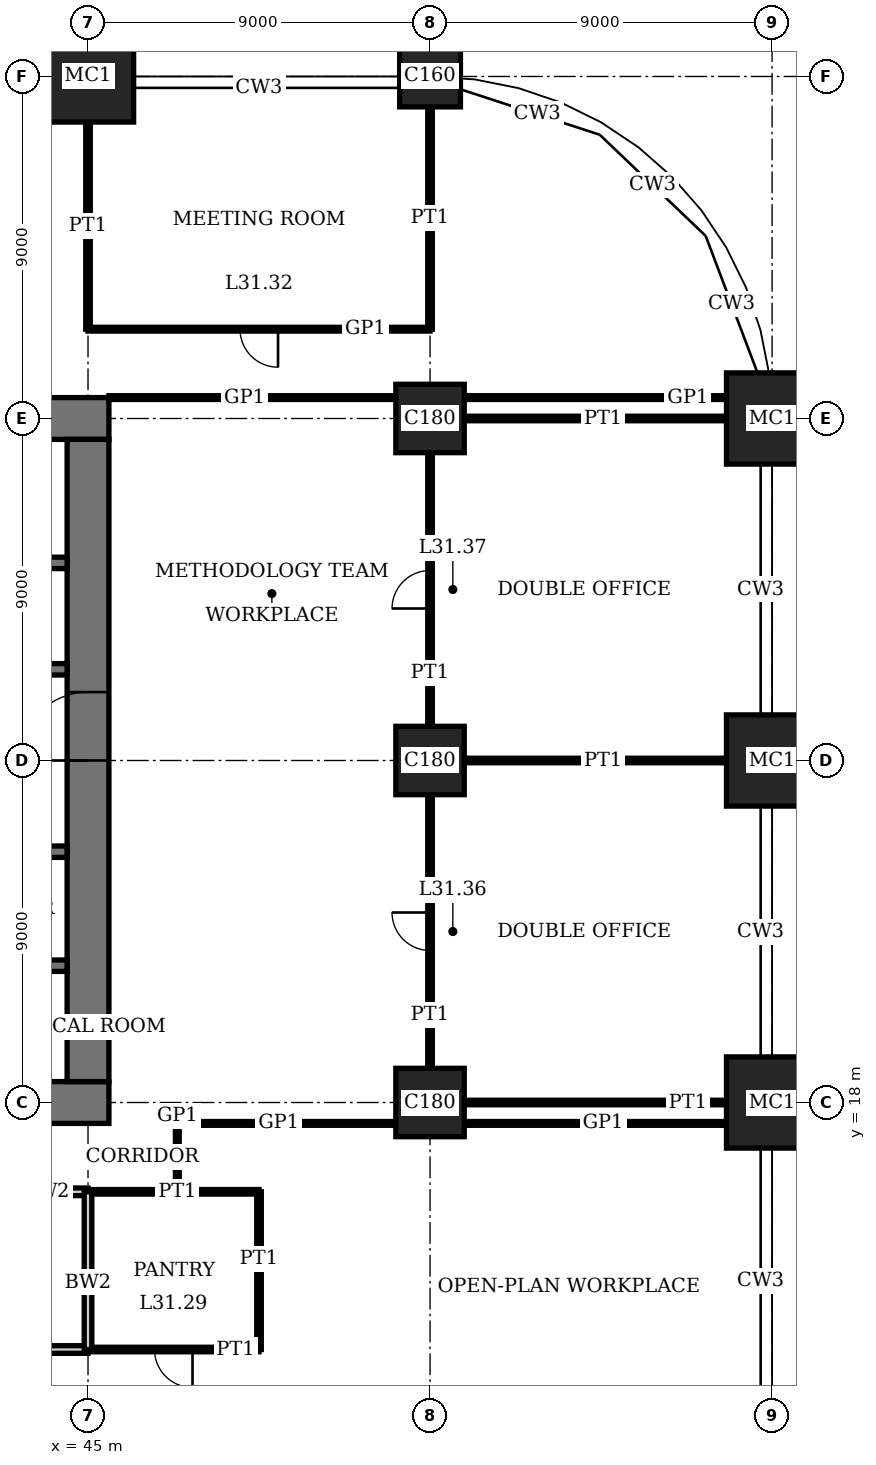
"""IFC4 building model, lengths in metres.
Left out: names, types, materials, properties, quantities, classifications, styles, units other than length and angle.
Written with IfcOpenShell. Run it as: python <this file> out.ifc"""

import sys

from ifc_helpers import new_model, si_unit, direction, frame, frame_2d, origin, origin_2d, place, context, subcontext, project, spatial, rectangle, extrude, element, fill, save


model = new_model("IFC4")
c1 = context("Model", 3, precision=1e-05, world=origin(), true_north=direction((0.0, 1.0)))
c2 = subcontext(c1, "Body", "Model", "MODEL_VIEW")
j1 = project(units=[si_unit("LENGTHUNIT", "METRE"), si_unit("PLANEANGLEUNIT", "RADIAN")], contexts=[c1])
p1 = place(None, origin())
s1 = spatial("IfcSite", under=j1, at=p1, CompositionType="ELEMENT")
p2 = place(p1, origin())
s2 = spatial("IfcBuilding", under=s1, at=p2, CompositionType="ELEMENT")
p3 = place(p2, frame((0.0, 0.0, 129.0)))
s3 = spatial("IfcBuildingStorey", under=s2, at=p3, CompositionType="ELEMENT", Elevation=129.0)
p4 = place(p3, frame((45.0, 45.0, 0.0), z_axis=(0.0, 0.0, 1.0), x_axis=(1.0, 0.0, 0.0)))
e1 = element("IfcColumn", 1, at=p4, inside=s3, PredefinedType="COLUMN", context=c2, shape_type="SweptSolid", body=[
    extrude(rectangle(XDim=2.4, YDim=2.4, at=origin_2d()), origin(), (0.0, 0.0, 1.0), 4.0),
])
for number, where, z_axis, x_axis in (
    (2, (54.0, 18.0, 0.0), (0.0, 0.0, 1.0), (1.0, 0.0, 0.0)),
    (3, (54.0, 27.0, 0.0), (0.0, 0.0, 1.0), (1.0, 0.0, 0.0)),
    (4, (54.0, 36.0, 0.0), (0.0, 0.0, 1.0), (1.0, 0.0, 0.0)),
):
    element("IfcColumn", number, at=place(p3, frame(where, z_axis=z_axis, x_axis=x_axis)), inside=s3, PredefinedType="COLUMN", context=c2, shape_type="SweptSolid", body=[
        extrude(rectangle(XDim=1.8, YDim=1.8, at=origin_2d()), origin(), (0.0, 0.0, 1.0), 4.0),
    ])
p5 = place(p3, frame((54.0, 45.0, 0.0), z_axis=(0.0, 0.0, 1.0), x_axis=(1.0, 0.0, 0.0)))
e5 = element("IfcColumn", 5, at=p5, inside=s3, PredefinedType="COLUMN", context=c2, shape_type="SweptSolid", body=[
    extrude(rectangle(XDim=1.6, YDim=1.6, at=origin_2d()), origin(), (0.0, 0.0, 1.0), 4.0),
])
for number, where, z_axis, x_axis in (
    (6, (63.0, 18.0, 0.0), (0.0, 0.0, 1.0), (1.0, 0.0, 0.0)),
    (7, (63.0, 27.0, 0.0), (0.0, 0.0, 1.0), (1.0, 0.0, 0.0)),
    (8, (63.0, 36.0, 0.0), (0.0, 0.0, 1.0), (1.0, 0.0, 0.0)),
):
    element("IfcColumn", number, at=place(p3, frame(where, z_axis=z_axis, x_axis=x_axis)), inside=s3, PredefinedType="COLUMN", context=c2, shape_type="SweptSolid", body=[
        extrude(rectangle(XDim=2.4, YDim=2.4, at=origin_2d()), origin(), (0.0, 0.0, 1.0), 4.0),
    ])
p6 = place(p3, frame((17.45, 18.0, 0.0), z_axis=(0.0, 0.0, 1.0), x_axis=(1.0, 0.0, 0.0)))
e9 = element("IfcWall", 9, at=p6, inside=s3, PredefinedType="SHEAR", context=c2, shape_type="SweptSolid", body=[
    extrude(rectangle(XDim=28.1, YDim=1.1, at=frame_2d((14.05, 0.0))), origin(), (0.0, 0.0, 1.0), 4.0),
])
p7 = place(p6, frame((11.55, 0.0, 0.0)))
e10 = element("IfcOpeningElement", 10, at=p7, cuts=e9, PredefinedType="OPENING", context=c2, shape_type="SweptSolid", body=[
    extrude(rectangle(XDim=1.0, YDim=2.4, at=frame_2d((0.5, 1.2))), frame((0.0, 0.56, 0.0), z_axis=(0.0, -1.0, 0.0), x_axis=(1.0, 0.0, 0.0)), (0.0, 0.0, 1.0), 1.12),
])
p8 = place(p6, frame((16.55, 0.0, 0.0)))
e11 = element("IfcOpeningElement", 11, at=p8, cuts=e9, PredefinedType="OPENING", context=c2, shape_type="SweptSolid", body=[
    extrude(rectangle(XDim=1.0, YDim=2.4, at=frame_2d((0.5, 1.2))), frame((0.0, 0.56, 0.0), z_axis=(0.0, -1.0, 0.0), x_axis=(1.0, 0.0, 0.0)), (0.0, 0.0, 1.0), 1.12),
])
p9 = place(p6, frame((20.0, 0.0, 0.0)))
e12 = element("IfcOpeningElement", 12, at=p9, cuts=e9, PredefinedType="OPENING", context=c2, shape_type="SweptSolid", body=[
    extrude(rectangle(XDim=1.1, YDim=2.4, at=frame_2d((0.55, 1.2))), frame((0.0, 0.56, 0.0), z_axis=(0.0, -1.0, 0.0), x_axis=(1.0, 0.0, 0.0)), (0.0, 0.0, 1.0), 1.12),
])
p10 = place(p6, frame((24.05, 0.0, 0.0)))
e13 = element("IfcOpeningElement", 13, at=p10, cuts=e9, PredefinedType="OPENING", context=c2, shape_type="SweptSolid", body=[
    extrude(rectangle(XDim=1.0, YDim=2.4, at=frame_2d((0.5, 1.2))), frame((0.0, 0.56, 0.0), z_axis=(0.0, -1.0, 0.0), x_axis=(1.0, 0.0, 0.0)), (0.0, 0.0, 1.0), 1.12),
])
p11 = place(p3, frame((45.55, 36.0, 0.0), z_axis=(0.0, 0.0, 1.0), x_axis=(-1.0, 0.0, 0.0)))
e14 = element("IfcWall", 14, at=p11, inside=s3, PredefinedType="SHEAR", context=c2, shape_type="SweptSolid", body=[
    extrude(rectangle(XDim=28.1, YDim=1.1, at=frame_2d((14.05, 0.0))), origin(), (0.0, 0.0, 1.0), 4.0),
])
p12 = place(p11, frame((11.55, 0.0, 0.0)))
e15 = element("IfcOpeningElement", 15, at=p12, cuts=e14, PredefinedType="OPENING", context=c2, shape_type="SweptSolid", body=[
    extrude(rectangle(XDim=1.0, YDim=2.4, at=frame_2d((0.5, 1.2))), frame((0.0, 0.56, 0.0), z_axis=(0.0, -1.0, 0.0), x_axis=(1.0, 0.0, 0.0)), (0.0, 0.0, 1.0), 1.12),
])
p13 = place(p11, frame((16.55, 0.0, 0.0)))
e16 = element("IfcOpeningElement", 16, at=p13, cuts=e14, PredefinedType="OPENING", context=c2, shape_type="SweptSolid", body=[
    extrude(rectangle(XDim=1.0, YDim=2.4, at=frame_2d((0.5, 1.2))), frame((0.0, 0.56, 0.0), z_axis=(0.0, -1.0, 0.0), x_axis=(1.0, 0.0, 0.0)), (0.0, 0.0, 1.0), 1.12),
])
p14 = place(p11, frame((20.0, 0.0, 0.0)))
e17 = element("IfcOpeningElement", 17, at=p14, cuts=e14, PredefinedType="OPENING", context=c2, shape_type="SweptSolid", body=[
    extrude(rectangle(XDim=1.1, YDim=2.4, at=frame_2d((0.55, 1.2))), frame((0.0, 0.56, 0.0), z_axis=(0.0, -1.0, 0.0), x_axis=(1.0, 0.0, 0.0)), (0.0, 0.0, 1.0), 1.12),
])
p15 = place(p11, frame((24.05, 0.0, 0.0)))
e18 = element("IfcOpeningElement", 18, at=p15, cuts=e14, PredefinedType="OPENING", context=c2, shape_type="SweptSolid", body=[
    extrude(rectangle(XDim=1.0, YDim=2.4, at=frame_2d((0.5, 1.2))), frame((0.0, 0.56, 0.0), z_axis=(0.0, -1.0, 0.0), x_axis=(1.0, 0.0, 0.0)), (0.0, 0.0, 1.0), 1.12),
])
p16 = place(p3, frame((45.0, 18.55, 0.0), z_axis=(0.0, 0.0, 1.0), x_axis=(0.0, 1.0, 0.0)))
e19 = element("IfcWall", 19, at=p16, inside=s3, PredefinedType="SHEAR", context=c2, shape_type="SweptSolid", body=[
    extrude(rectangle(XDim=16.9, YDim=1.1, at=frame_2d((8.45, 0.0))), origin(), (0.0, 0.0, 1.0), 4.0),
])
p17 = place(p16, frame((8.45, 0.0, 0.0)))
e20 = element("IfcOpeningElement", 20, at=p17, cuts=e19, PredefinedType="OPENING", context=c2, shape_type="SweptSolid", body=[
    extrude(rectangle(XDim=1.8, YDim=2.4, at=frame_2d((0.9, 1.2))), frame((0.0, 0.56, 0.0), z_axis=(0.0, -1.0, 0.0), x_axis=(1.0, 0.0, 0.0)), (0.0, 0.0, 1.0), 1.12),
])
p18 = place(p3, frame((36.15, 32.2, 0.0), z_axis=(0.0, 0.0, 1.0), x_axis=(1.0, 0.0, 0.0)))
e21 = element("IfcWall", 21, at=p18, inside=s3, PredefinedType="SHEAR", context=c2, shape_type="SweptSolid", body=[
    extrude(rectangle(XDim=8.3, YDim=0.3, at=frame_2d((4.15, 0.0))), origin(), (0.0, 0.0, 1.0), 4.0),
])
p19 = place(p18, frame((0.45, 0.0, 0.0)))
e22 = element("IfcOpeningElement", 22, at=p19, cuts=e21, PredefinedType="OPENING", context=c2, shape_type="SweptSolid", body=[
    extrude(rectangle(XDim=1.0, YDim=2.4, at=frame_2d((0.5, 1.2))), frame((0.0, 0.16, 0.0), z_axis=(0.0, -1.0, 0.0), x_axis=(1.0, 0.0, 0.0)), (0.0, 0.0, 1.0), 0.32),
])
p20 = place(p3, frame((18.55, 24.6, 0.0), z_axis=(0.0, 0.0, 1.0), x_axis=(1.0, 0.0, 0.0)))
e23 = element("IfcWall", 23, at=p20, inside=s3, PredefinedType="SHEAR", context=c2, shape_type="SweptSolid", body=[
    extrude(rectangle(XDim=25.9, YDim=0.3, at=frame_2d((12.95, 0.0))), origin(), (0.0, 0.0, 1.0), 4.0),
])
p21 = place(p20, frame((4.95, 0.0, 0.0)))
e24 = element("IfcOpeningElement", 24, at=p21, cuts=e23, PredefinedType="OPENING", context=c2, shape_type="SweptSolid", body=[
    extrude(rectangle(XDim=1.0, YDim=2.4, at=frame_2d((0.5, 1.2))), frame((0.0, 0.16, 0.0), z_axis=(0.0, -1.0, 0.0), x_axis=(1.0, 0.0, 0.0)), (0.0, 0.0, 1.0), 0.32),
])
p22 = place(p20, frame((24.5, 0.0, 0.0)))
e25 = element("IfcOpeningElement", 25, at=p22, cuts=e23, PredefinedType="OPENING", context=c2, shape_type="SweptSolid", body=[
    extrude(rectangle(XDim=0.9, YDim=2.1, at=frame_2d((0.45, 1.05))), frame((0.0, 0.16, 0.0), z_axis=(0.0, -1.0, 0.0), x_axis=(1.0, 0.0, 0.0)), (0.0, 0.0, 1.0), 0.32),
])
p23 = place(p20, frame((21.3, 0.0, 0.0)))
e26 = element("IfcOpeningElement", 26, at=p23, cuts=e23, PredefinedType="OPENING", context=c2, shape_type="SweptSolid", body=[
    extrude(rectangle(XDim=1.3, YDim=2.4, at=frame_2d((0.65, 1.2))), frame((0.0, 0.16, 0.0), z_axis=(0.0, -1.0, 0.0), x_axis=(1.0, 0.0, 0.0)), (0.0, 0.0, 1.0), 0.32),
])
p24 = place(p3, frame((18.55, 29.4, 0.0), z_axis=(0.0, 0.0, 1.0), x_axis=(1.0, 0.0, 0.0)))
e27 = element("IfcWall", 27, at=p24, inside=s3, PredefinedType="SHEAR", context=c2, shape_type="SweptSolid", body=[
    extrude(rectangle(XDim=25.9, YDim=0.3, at=frame_2d((12.95, 0.0))), origin(), (0.0, 0.0, 1.0), 4.0),
])
p25 = place(p24, frame((19.95, 0.0, 0.0)))
e28 = element("IfcOpeningElement", 28, at=p25, cuts=e27, PredefinedType="OPENING", context=c2, shape_type="SweptSolid", body=[
    extrude(rectangle(XDim=1.0, YDim=2.4, at=frame_2d((0.5, 1.2))), frame((0.0, 0.16, 0.0), z_axis=(0.0, -1.0, 0.0), x_axis=(1.0, 0.0, 0.0)), (0.0, 0.0, 1.0), 0.32),
])
p26 = place(p24, frame((0.5, 0.0, 0.0)))
e29 = element("IfcOpeningElement", 29, at=p26, cuts=e27, PredefinedType="OPENING", context=c2, shape_type="SweptSolid", body=[
    extrude(rectangle(XDim=0.9, YDim=2.1, at=frame_2d((0.45, 1.05))), frame((0.0, 0.16, 0.0), z_axis=(0.0, -1.0, 0.0), x_axis=(1.0, 0.0, 0.0)), (0.0, 0.0, 1.0), 0.32),
])
p27 = place(p24, frame((15.4, 0.0, 0.0)))
e30 = element("IfcOpeningElement", 30, at=p27, cuts=e27, PredefinedType="OPENING", context=c2, shape_type="SweptSolid", body=[
    extrude(rectangle(XDim=1.1, YDim=2.4, at=frame_2d((0.55, 1.2))), frame((0.0, 0.16, 0.0), z_axis=(0.0, -1.0, 0.0), x_axis=(1.0, 0.0, 0.0)), (0.0, 0.0, 1.0), 0.32),
])
p28 = place(p24, frame((12.4, 0.0, 0.0)))
e31 = element("IfcOpeningElement", 31, at=p28, cuts=e27, PredefinedType="OPENING", context=c2, shape_type="SweptSolid", body=[
    extrude(rectangle(XDim=1.1, YDim=2.4, at=frame_2d((0.55, 1.2))), frame((0.0, 0.16, 0.0), z_axis=(0.0, -1.0, 0.0), x_axis=(1.0, 0.0, 0.0)), (0.0, 0.0, 1.0), 0.32),
])
p29 = place(p24, frame((3.3, 0.0, 0.0)))
e32 = element("IfcOpeningElement", 32, at=p29, cuts=e27, PredefinedType="OPENING", context=c2, shape_type="SweptSolid", body=[
    extrude(rectangle(XDim=1.3, YDim=2.4, at=frame_2d((0.65, 1.2))), frame((0.0, 0.16, 0.0), z_axis=(0.0, -1.0, 0.0), x_axis=(1.0, 0.0, 0.0)), (0.0, 0.0, 1.0), 0.32),
])
p30 = place(p3, frame((27.15, 21.6, 0.0), z_axis=(0.0, 0.0, 1.0), x_axis=(1.0, 0.0, 0.0)))
e33 = element("IfcWall", 33, at=p30, inside=s3, PredefinedType="SHEAR", context=c2, shape_type="SweptSolid", body=[
    extrude(rectangle(XDim=17.3, YDim=0.3, at=frame_2d((8.65, 0.0))), origin(), (0.0, 0.0, 1.0), 4.0),
])
p31 = place(p3, frame((36.0, 11.5, 0.0), z_axis=(0.0, 0.0, 1.0), x_axis=(1.0, 0.0, 0.0)))
e34 = element("IfcWall", 34, at=p31, inside=s3, PredefinedType="SOLIDWALL", context=c2, shape_type="SweptSolid", body=[
    extrude(rectangle(XDim=9.0, YDim=0.2, at=frame_2d((4.5, 0.0))), origin(), (0.0, 0.0, 1.0), 3.75),
])
p32 = place(p31, frame((4.0, 0.0, 0.0)))
e35 = element("IfcOpeningElement", 35, at=p32, cuts=e34, PredefinedType="OPENING", context=c2, shape_type="SweptSolid", body=[
    extrude(rectangle(XDim=1.0, YDim=2.4, at=frame_2d((0.5, 1.2))), frame((0.0, 0.11, 0.0), z_axis=(0.0, -1.0, 0.0), x_axis=(1.0, 0.0, 0.0)), (0.0, 0.0, 1.0), 0.22),
])
p33 = place(p3, frame((45.0, 11.5, 0.0), z_axis=(0.0, 0.0, 1.0), x_axis=(1.0, 0.0, 0.0)))
e36 = element("IfcWall", 36, at=p33, inside=s3, PredefinedType="PARTITIONING", context=c2, shape_type="SweptSolid", body=[
    extrude(rectangle(XDim=4.5, YDim=0.12, at=frame_2d((2.25, 0.0))), origin(), (0.0, 0.0, 1.0), 3.75),
])
p34 = place(p33, frame((1.75, 0.0, 0.0)))
e37 = element("IfcOpeningElement", 37, at=p34, cuts=e36, PredefinedType="OPENING", context=c2, shape_type="SweptSolid", body=[
    extrude(rectangle(XDim=1.0, YDim=2.4, at=frame_2d((0.5, 1.2))), frame((0.0, 0.07, 0.0), z_axis=(0.0, -1.0, 0.0), x_axis=(1.0, 0.0, 0.0)), (0.0, 0.0, 1.0), 0.14),
])
p35 = place(p3, frame((36.0, 15.65, 0.0), z_axis=(0.0, 0.0, 1.0), x_axis=(1.0, 0.0, 0.0)))
e38 = element("IfcWall", 38, at=p35, inside=s3, PredefinedType="SOLIDWALL", context=c2, shape_type="SweptSolid", body=[
    extrude(rectangle(XDim=9.0, YDim=0.2, at=frame_2d((4.5, 0.0))), origin(), (0.0, 0.0, 1.0), 3.75),
])
p36 = place(p3, frame((45.0, 15.65, 0.0), z_axis=(0.0, 0.0, 1.0), x_axis=(1.0, 0.0, 0.0)))
e39 = element("IfcWall", 39, at=p36, inside=s3, PredefinedType="PARTITIONING", context=c2, shape_type="SweptSolid", body=[
    extrude(rectangle(XDim=4.5, YDim=0.12, at=frame_2d((2.25, 0.0))), origin(), (0.0, 0.0, 1.0), 3.75),
])
p37 = place(p3, frame((47.35, 17.45, 0.0), z_axis=(0.0, 0.0, 1.0), x_axis=(1.0, 0.0, 0.0)))
e40 = element("IfcWall", 40, at=p37, inside=s3, PredefinedType="PARTITIONING", context=c2, shape_type="SweptSolid", body=[
    extrude(rectangle(XDim=5.75, YDim=0.1, at=frame_2d((2.875, 0.0))), origin(), (0.0, 0.0, 1.0), 3.75),
])
p38 = place(p3, frame((54.9, 17.45, 0.0), z_axis=(0.0, 0.0, 1.0), x_axis=(1.0, 0.0, 0.0)))
e41 = element("IfcWall", 41, at=p38, inside=s3, PredefinedType="PARTITIONING", context=c2, shape_type="SweptSolid", body=[
    extrude(rectangle(XDim=6.9, YDim=0.1, at=frame_2d((3.45, 0.0))), origin(), (0.0, 0.0, 1.0), 3.75),
])
for number, where, z_axis, x_axis in (
    (42, (54.9, 18.0, 0.0), (0.0, 0.0, 1.0), (1.0, 0.0, 0.0)),
    (43, (54.9, 27.0, 0.0), (0.0, 0.0, 1.0), (1.0, 0.0, 0.0)),
    (44, (54.9, 36.0, 0.0), (0.0, 0.0, 1.0), (1.0, 0.0, 0.0)),
):
    element("IfcWall", number, at=place(p3, frame(where, z_axis=z_axis, x_axis=x_axis)), inside=s3, PredefinedType="PARTITIONING", context=c2, shape_type="SweptSolid", body=[
        extrude(rectangle(XDim=6.9, YDim=0.12, at=frame_2d((3.45, 0.0))), origin(), (0.0, 0.0, 1.0), 3.05),
    ])
p39 = place(p3, frame((45.55, 36.55, 0.0), z_axis=(0.0, 0.0, 1.0), x_axis=(1.0, 0.0, 0.0)))
e45 = element("IfcWall", 45, at=p39, inside=s3, PredefinedType="PARTITIONING", context=c2, shape_type="SweptSolid", body=[
    extrude(rectangle(XDim=7.55, YDim=0.1, at=frame_2d((3.775, 0.0))), origin(), (0.0, 0.0, 1.0), 3.75),
])
p40 = place(p3, frame((54.9, 36.55, 0.0), z_axis=(0.0, 0.0, 1.0), x_axis=(1.0, 0.0, 0.0)))
e46 = element("IfcWall", 46, at=p40, inside=s3, PredefinedType="PARTITIONING", context=c2, shape_type="SweptSolid", body=[
    extrude(rectangle(XDim=6.9, YDim=0.1, at=frame_2d((3.45, 0.0))), origin(), (0.0, 0.0, 1.0), 3.75),
])
p41 = place(p3, frame((45.0, 38.35, 0.0), z_axis=(0.0, 0.0, 1.0), x_axis=(1.0, 0.0, 0.0)))
e47 = element("IfcWall", 47, at=p41, inside=s3, PredefinedType="PARTITIONING", context=c2, shape_type="SweptSolid", body=[
    extrude(rectangle(XDim=9.0, YDim=0.1, at=frame_2d((4.5, 0.0))), origin(), (0.0, 0.0, 1.0), 3.75),
])
p42 = place(p41, frame((4.0, 0.0, 0.0)))
e48 = element("IfcOpeningElement", 48, at=p42, cuts=e47, PredefinedType="OPENING", context=c2, shape_type="SweptSolid", body=[
    extrude(rectangle(XDim=1.0, YDim=2.4, at=frame_2d((0.5, 1.2))), frame((0.0, 0.06, 0.0), z_axis=(0.0, -1.0, 0.0), x_axis=(1.0, 0.0, 0.0)), (0.0, 0.0, 1.0), 0.12),
])
p43 = place(p3, frame((45.0, 11.5, 0.0), z_axis=(0.0, 0.0, 1.0), x_axis=(0.0, 1.0, 0.0)))
e49 = element("IfcWall", 49, at=p43, inside=s3, PredefinedType="SOLIDWALL", context=c2, shape_type="SweptSolid", body=[
    extrude(rectangle(XDim=4.15, YDim=0.2, at=frame_2d((2.075, 0.0))), origin(), (0.0, 0.0, 1.0), 3.05),
])
p44 = place(p3, frame((45.0, 38.35, 0.0), z_axis=(0.0, 0.0, 1.0), x_axis=(0.0, 1.0, 0.0)))
e50 = element("IfcWall", 50, at=p44, inside=s3, PredefinedType="PARTITIONING", context=c2, shape_type="SweptSolid", body=[
    extrude(rectangle(XDim=5.45, YDim=0.12, at=frame_2d((2.725, 0.0))), origin(), (0.0, 0.0, 1.0), 3.05),
])
p45 = place(p3, frame((47.35, 15.65, 0.0), z_axis=(0.0, 0.0, 1.0), x_axis=(0.0, 1.0, 0.0)))
e51 = element("IfcWall", 51, at=p45, inside=s3, PredefinedType="PARTITIONING", context=c2, shape_type="SweptSolid", body=[
    extrude(rectangle(XDim=1.8, YDim=0.1, at=frame_2d((0.9, 0.0))), origin(), (0.0, 0.0, 1.0), 3.75),
])
p46 = place(p3, frame((49.5, 11.5, 0.0), z_axis=(0.0, 0.0, 1.0), x_axis=(0.0, 1.0, 0.0)))
e52 = element("IfcWall", 52, at=p46, inside=s3, PredefinedType="PARTITIONING", context=c2, shape_type="SweptSolid", body=[
    extrude(rectangle(XDim=4.15, YDim=0.12, at=frame_2d((2.075, 0.0))), origin(), (0.0, 0.0, 1.0), 3.75),
])
p47 = place(p3, frame((54.0, 18.9, 0.0), z_axis=(0.0, 0.0, 1.0), x_axis=(0.0, 1.0, 0.0)))
e53 = element("IfcWall", 53, at=p47, inside=s3, PredefinedType="PARTITIONING", context=c2, shape_type="SweptSolid", body=[
    extrude(rectangle(XDim=7.2, YDim=0.12, at=frame_2d((3.6, 0.0))), origin(), (0.0, 0.0, 1.0), 3.05),
])
p48 = place(p47, frame((3.1, 0.0, 0.0)))
e54 = element("IfcOpeningElement", 54, at=p48, cuts=e53, PredefinedType="OPENING", context=c2, shape_type="SweptSolid", body=[
    extrude(rectangle(XDim=1.0, YDim=2.4, at=frame_2d((0.5, 1.2))), frame((0.0, 0.07, 0.0), z_axis=(0.0, -1.0, 0.0), x_axis=(1.0, 0.0, 0.0)), (0.0, 0.0, 1.0), 0.14),
])
p49 = place(p3, frame((54.0, 27.9, 0.0), z_axis=(0.0, 0.0, 1.0), x_axis=(0.0, 1.0, 0.0)))
e55 = element("IfcWall", 55, at=p49, inside=s3, PredefinedType="PARTITIONING", context=c2, shape_type="SweptSolid", body=[
    extrude(rectangle(XDim=7.2, YDim=0.12, at=frame_2d((3.6, 0.0))), origin(), (0.0, 0.0, 1.0), 3.05),
])
p50 = place(p49, frame((3.1, 0.0, 0.0)))
e56 = element("IfcOpeningElement", 56, at=p50, cuts=e55, PredefinedType="OPENING", context=c2, shape_type="SweptSolid", body=[
    extrude(rectangle(XDim=1.0, YDim=2.4, at=frame_2d((0.5, 1.2))), frame((0.0, 0.07, 0.0), z_axis=(0.0, -1.0, 0.0), x_axis=(1.0, 0.0, 0.0)), (0.0, 0.0, 1.0), 0.14),
])
p51 = place(p3, frame((54.0, 38.35, 0.0), z_axis=(0.0, 0.0, 1.0), x_axis=(0.0, 1.0, 0.0)))
e57 = element("IfcWall", 57, at=p51, inside=s3, PredefinedType="PARTITIONING", context=c2, shape_type="SweptSolid", body=[
    extrude(rectangle(XDim=5.85, YDim=0.12, at=frame_2d((2.925, 0.0))), origin(), (0.0, 0.0, 1.0), 3.05),
])
p52 = place(p17, origin())
e58 = element("IfcDoor", 58, at=p52, inside=s3, OperationType="DOUBLE_DOOR_DOUBLE_SWING", PredefinedType="DOOR", context=c2, shape_type="SweptSolid", body=[
    extrude(rectangle(XDim=1.8, YDim=2.4, at=frame_2d((0.9, 1.2))), frame((0.0, 0.03, 0.0), z_axis=(0.0, -1.0, 0.0), x_axis=(1.0, 0.0, 0.0)), (0.0, 0.0, 1.0), 0.06),
    extrude(rectangle(XDim=0.04, YDim=2.4, at=frame_2d((0.02, 1.2))), frame((0.0, 0.55, 0.0), z_axis=(0.0, -1.0, 0.0), x_axis=(1.0, 0.0, 0.0)), (0.0, 0.0, 1.0), 1.1),
    extrude(rectangle(XDim=0.04, YDim=2.4, at=frame_2d((1.78, 1.2))), frame((0.0, 0.55, 0.0), z_axis=(0.0, -1.0, 0.0), x_axis=(1.0, 0.0, 0.0)), (0.0, 0.0, 1.0), 1.1),
    extrude(rectangle(XDim=1.8, YDim=0.04, at=frame_2d((0.9, 2.38))), frame((0.0, 0.55, 0.0), z_axis=(0.0, -1.0, 0.0), x_axis=(1.0, 0.0, 0.0)), (0.0, 0.0, 1.0), 1.1),
])
fill(e20, e58)
p53 = place(p34, origin())
e59 = element("IfcDoor", 59, at=p53, inside=s3, OperationType="SINGLE_SWING_RIGHT", PredefinedType="DOOR", context=c2, shape_type="SweptSolid", body=[
    extrude(rectangle(XDim=1.0, YDim=2.4, at=frame_2d((0.5, 1.2))), frame((0.0, 0.025, 0.0), z_axis=(0.0, -1.0, 0.0), x_axis=(1.0, 0.0, 0.0)), (0.0, 0.0, 1.0), 0.05),
])
fill(e37, e59)
p54 = place(p42, origin())
e60 = element("IfcDoor", 60, at=p54, inside=s3, OperationType="SINGLE_SWING_RIGHT", PredefinedType="DOOR", context=c2, shape_type="SweptSolid", body=[
    extrude(rectangle(XDim=1.0, YDim=2.4, at=frame_2d((0.5, 1.2))), frame((0.0, 0.02, 0.0), z_axis=(0.0, -1.0, 0.0), x_axis=(1.0, 0.0, 0.0)), (0.0, 0.0, 1.0), 0.04),
])
fill(e48, e60)
p55 = place(p48, origin())
e61 = element("IfcDoor", 61, at=p55, inside=s3, OperationType="SINGLE_SWING_LEFT", PredefinedType="DOOR", context=c2, shape_type="SweptSolid", body=[
    extrude(rectangle(XDim=1.0, YDim=2.4, at=frame_2d((0.5, 1.2))), frame((0.0, 0.025, 0.0), z_axis=(0.0, -1.0, 0.0), x_axis=(1.0, 0.0, 0.0)), (0.0, 0.0, 1.0), 0.05),
])
fill(e54, e61)
p56 = place(p50, origin())
e62 = element("IfcDoor", 62, at=p56, inside=s3, OperationType="SINGLE_SWING_RIGHT", PredefinedType="DOOR", context=c2, shape_type="SweptSolid", body=[
    extrude(rectangle(XDim=1.0, YDim=2.4, at=frame_2d((0.5, 1.2))), frame((0.0, 0.025, 0.0), z_axis=(0.0, -1.0, 0.0), x_axis=(1.0, 0.0, 0.0)), (0.0, 0.0, 1.0), 0.05),
])
fill(e56, e62)
save(model, sys.argv[1])
